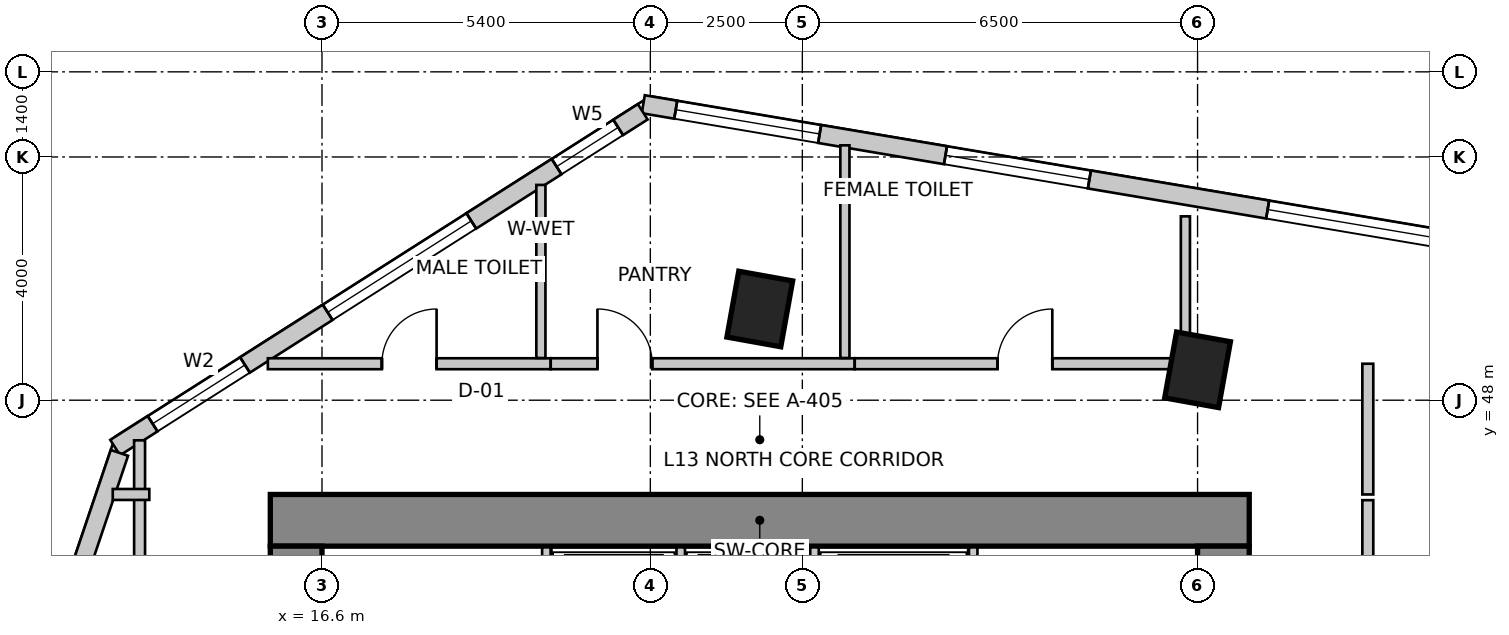
"""IFC4 building model, lengths in metres.
Left out: names, types, materials, properties, quantities, classifications, styles, units other than length and angle.
Written with IfcOpenShell. Run it as: python <this file> out.ifc"""

import sys

from ifc_helpers import new_model, si_unit, direction, frame, frame_2d, origin, origin_2d, place, context, subcontext, project, spatial, rectangle, extrude, source, transform, mapped, element, fill, save


model = new_model("IFC4")
c1 = context("Model", 3, precision=1e-05, world=origin(), true_north=direction((0.0, 1.0)))
c2 = subcontext(c1, "Body", "Model", "MODEL_VIEW")
j1 = project(units=[si_unit("LENGTHUNIT", "METRE"), si_unit("PLANEANGLEUNIT", "RADIAN")], contexts=[c1])
p1 = place(None, origin())
s1 = spatial("IfcSite", under=j1, at=p1, CompositionType="ELEMENT")
p2 = place(p1, origin())
s2 = spatial("IfcBuilding", under=s1, at=p2, CompositionType="ELEMENT")
p3 = place(p2, frame((0.0, 0.0, 55.0)))
s3 = spatial("IfcBuildingStorey", under=s2, at=p3, CompositionType="ELEMENT", Elevation=55.0)
p4 = place(p3, frame((15.75, 46.025, 0.0), z_axis=(0.0, 0.0, 1.0), x_axis=(1.0, 0.0, 0.0)))
e1 = element("IfcWall", 1, at=p4, inside=s3, PredefinedType="SHEAR", context=c2, shape_type="SweptSolid", body=[
    extrude(rectangle(XDim=16.1, YDim=0.85, at=frame_2d((8.05, 0.0))), origin(), (0.0, 0.0, 1.0), 4.0),
])
p5 = place(p3, frame((16.175, 34.2, 0.0), z_axis=(0.0, 0.0, 1.0), x_axis=(0.0, 1.0, 0.0)))
e2 = element("IfcWall", 2, at=p5, inside=s3, PredefinedType="SHEAR", context=c2, shape_type="SweptSolid", body=[
    extrude(rectangle(XDim=11.4, YDim=0.85, at=frame_2d((5.7, 0.0))), origin(), (0.0, 0.0, 1.0), 4.0),
])
m1 = source(origin(), c2, "Body", "SweptSolid", [
    extrude(rectangle(XDim=1.1, YDim=2.15, at=frame_2d((0.55, 1.075))), frame((0.0, 0.435, 0.0), z_axis=(0.0, -1.0, 0.0), x_axis=(1.0, 0.0, 0.0)), (0.0, 0.0, 1.0), 0.87),
])
p6 = place(p5, frame((7.15, 0.0, 0.0)))
e3 = element("IfcOpeningElement", 3, at=p6, cuts=e2, PredefinedType="OPENING", context=c2, shape_type="MappedRepresentation", body=[
    mapped(m1, transform((0.0, 0.0, 0.0), scale=1.0)),
])
p7 = place(p3, frame((31.425, 34.2, 0.0), z_axis=(0.0, 0.0, 1.0), x_axis=(0.0, 1.0, 0.0)))
e4 = element("IfcWall", 4, at=p7, inside=s3, PredefinedType="SHEAR", context=c2, shape_type="SweptSolid", body=[
    extrude(rectangle(XDim=11.4, YDim=0.85, at=frame_2d((5.7, 0.0))), origin(), (0.0, 0.0, 1.0), 4.0),
])
p8 = place(p7, frame((7.35, 0.0, 0.0)))
e5 = element("IfcOpeningElement", 5, at=p8, cuts=e4, PredefinedType="OPENING", context=c2, shape_type="MappedRepresentation", body=[
    mapped(m1, transform((0.0, 0.0, 0.0), scale=1.0)),
])
m2 = source(origin(), c2, "Body", "SweptSolid", [
    extrude(rectangle(XDim=0.9, YDim=1.1, at=origin_2d()), origin(), (0.0, 0.0, 1.0), 4.0),
])
for number, where, z_axis, x_axis in (
    (6, (23.8, 49.5, 0.0), (0.0, 0.0, 1.0), (0.984, -0.177, 0.0)),
    (7, (31.0, 48.5, 0.0), (0.0, 0.0, 1.0), (0.984, -0.177, 0.0)),
):
    element("IfcColumn", number, at=place(p3, frame(where, z_axis=z_axis, x_axis=x_axis)), inside=s3, PredefinedType="COLUMN", context=c2, shape_type="MappedRepresentation", body=[
        mapped(m2, transform((0.0, 0.0, 0.0), scale=1.0)),
    ])
p9 = place(p3, frame((58.761, 46.648, 0.0), z_axis=(0.0, 0.0, 1.0), x_axis=(-0.98607502735, 0.166301053624, 0.0)))
e8 = element("IfcWall", 8, at=p9, inside=s3, PredefinedType="SOLIDWALL", context=c2, shape_type="SweptSolid", body=[
    extrude(rectangle(XDim=37.397, YDim=0.3, at=frame_2d((18.699, 0.0))), origin(), (0.0, 0.0, 1.0), 3.75),
])
m3 = source(origin(), c2, "Body", "SweptSolid", [
    extrude(rectangle(XDim=2.1, YDim=2.0, at=frame_2d((1.05, 1.0))), frame((0.0, 0.16, 0.0), z_axis=(0.0, -1.0, 0.0), x_axis=(1.0, 0.0, 0.0)), (0.0, 0.0, 1.0), 0.32),
])
p10 = place(p9, frame((0.525, 0.0, 0.85)))
e9 = element("IfcOpeningElement", 9, at=p10, cuts=e8, PredefinedType="OPENING", context=c2, shape_type="MappedRepresentation", body=[
    mapped(m3, transform((0.0, 0.0, 0.0), scale=1.0)),
])
m4 = source(origin(), c2, "Body", "SweptSolid", [
    extrude(rectangle(XDim=2.4, YDim=2.2, at=frame_2d((1.2, 1.1))), frame((0.0, 0.16, 0.0), z_axis=(0.0, -1.0, 0.0), x_axis=(1.0, 0.0, 0.0)), (0.0, 0.0, 1.0), 0.32),
])
p11 = place(p9, frame((5.557, 0.0, 0.85)))
e10 = element("IfcOpeningElement", 10, at=p11, cuts=e8, PredefinedType="OPENING", context=c2, shape_type="MappedRepresentation", body=[
    mapped(m4, transform((0.0, 0.0, 0.0), scale=1.0)),
])
p12 = place(p9, frame((12.972, 0.0, 0.85)))
e11 = element("IfcOpeningElement", 11, at=p12, cuts=e8, PredefinedType="OPENING", context=c2, shape_type="MappedRepresentation", body=[
    mapped(m4, transform((0.0, 0.0, 0.0), scale=1.0)),
])
p13 = place(p9, frame((19.394, 0.0, 0.85)))
e12 = element("IfcOpeningElement", 12, at=p13, cuts=e8, PredefinedType="OPENING", context=c2, shape_type="MappedRepresentation", body=[
    mapped(m4, transform((0.0, 0.0, 0.0), scale=1.0)),
])
m5 = source(origin(), c2, "Body", "SweptSolid", [
    extrude(rectangle(XDim=2.8, YDim=2.4, at=frame_2d((1.4, 1.2))), frame((0.0, 0.16, 0.0), z_axis=(0.0, -1.0, 0.0), x_axis=(1.0, 0.0, 0.0)), (0.0, 0.0, 1.0), 0.32),
])
p14 = place(p9, frame((24.184, 0.0, 0.85)))
e13 = element("IfcOpeningElement", 13, at=p14, cuts=e8, PredefinedType="OPENING", context=c2, shape_type="MappedRepresentation", body=[
    mapped(m5, transform((0.0, 0.0, 0.0), scale=1.0)),
])
p15 = place(p9, frame((29.957, 0.0, 0.85)))
e14 = element("IfcOpeningElement", 14, at=p15, cuts=e8, PredefinedType="OPENING", context=c2, shape_type="MappedRepresentation", body=[
    mapped(m4, transform((0.0, 0.0, 0.0), scale=1.0)),
])
p16 = place(p9, frame((34.456, 0.0, 0.85)))
e15 = element("IfcOpeningElement", 15, at=p16, cuts=e8, PredefinedType="OPENING", context=c2, shape_type="MappedRepresentation", body=[
    mapped(m4, transform((0.0, 0.0, 0.0), scale=1.0)),
])
p17 = place(p3, frame((21.875, 52.743, 0.0), z_axis=(0.0, 0.0, 1.0), x_axis=(-0.843647802826, -0.536896996441, 0.0)))
e16 = element("IfcWall", 16, at=p17, inside=s3, PredefinedType="SOLIDWALL", context=c2, shape_type="SweptSolid", body=[
    extrude(rectangle(XDim=10.284, YDim=0.3, at=frame_2d((5.142, 0.0))), origin(), (0.0, 0.0, 1.0), 3.75),
])
m6 = source(origin(), c2, "Body", "SweptSolid", [
    extrude(rectangle(XDim=1.2, YDim=1.6, at=frame_2d((0.6, 0.8))), frame((0.0, 0.16, 0.0), z_axis=(0.0, -1.0, 0.0), x_axis=(1.0, 0.0, 0.0)), (0.0, 0.0, 1.0), 0.32),
])
p18 = place(p17, frame((0.479, 0.0, 0.85)))
e17 = element("IfcOpeningElement", 17, at=p18, cuts=e16, PredefinedType="OPENING", context=c2, shape_type="MappedRepresentation", body=[
    mapped(m6, transform((0.0, 0.0, 0.0), scale=1.0)),
])
p19 = place(p17, frame((3.342, 0.0, 0.85)))
e18 = element("IfcOpeningElement", 18, at=p19, cuts=e16, PredefinedType="OPENING", context=c2, shape_type="MappedRepresentation", body=[
    mapped(m5, transform((0.0, 0.0, 0.0), scale=1.0)),
])
m7 = source(origin(), c2, "Body", "SweptSolid", [
    extrude(rectangle(XDim=1.8, YDim=2.1, at=frame_2d((0.9, 1.05))), frame((0.0, 0.16, 0.0), z_axis=(0.0, -1.0, 0.0), x_axis=(1.0, 0.0, 0.0)), (0.0, 0.0, 1.0), 0.32),
])
p20 = place(p17, frame((7.754, 0.0, 0.85)))
e19 = element("IfcOpeningElement", 19, at=p20, cuts=e16, PredefinedType="OPENING", context=c2, shape_type="MappedRepresentation", body=[
    mapped(m7, transform((0.0, 0.0, 0.0), scale=1.0)),
])
p21 = place(p3, frame((13.269, 47.134, 0.0), z_axis=(0.0, 0.0, 1.0), x_axis=(-0.319920423265, -0.947444416722, 0.0)))
e20 = element("IfcWall", 20, at=p21, inside=s3, PredefinedType="SOLIDWALL", context=c2, shape_type="SweptSolid", body=[
    extrude(rectangle(XDim=16.135, YDim=0.3, at=frame_2d((8.067, 0.0))), origin(), (0.0, 0.0, 1.0), 3.75),
])
p22 = place(p21, frame((2.188, 0.0, 0.85)))
e21 = element("IfcOpeningElement", 21, at=p22, cuts=e20, PredefinedType="OPENING", context=c2, shape_type="MappedRepresentation", body=[
    mapped(m4, transform((0.0, 0.0, 0.0), scale=1.0)),
])
p23 = place(p21, frame((6.959, 0.0, 0.85)))
e22 = element("IfcOpeningElement", 22, at=p23, cuts=e20, PredefinedType="OPENING", context=c2, shape_type="MappedRepresentation", body=[
    mapped(m5, transform((0.0, 0.0, 0.0), scale=1.0)),
])
p24 = place(p21, frame((12.13, 0.0, 0.85)))
e23 = element("IfcOpeningElement", 23, at=p24, cuts=e20, PredefinedType="OPENING", context=c2, shape_type="MappedRepresentation", body=[
    mapped(m4, transform((0.0, 0.0, 0.0), scale=1.0)),
])
for number, where, z_axis, x_axis in (
    (24, (20.29, 43.28, 0.0), (0.0, 0.0, 1.0), (0.0, 1.0, 0.0)),
    (25, (27.31, 43.28, 0.0), (0.0, 0.0, 1.0), (0.0, 1.0, 0.0)),
):
    element("IfcWall", number, at=place(p3, frame(where, z_axis=z_axis, x_axis=x_axis)), inside=s3, PredefinedType="SOLIDWALL", context=c2, shape_type="SweptSolid", body=[
        extrude(rectangle(XDim=2.3, YDim=0.14, at=frame_2d((1.15, 0.0))), origin(), (0.0, 0.0, 1.0), 3.75),
    ])
for number, where, z_axis, x_axis in (
    (26, (22.5, 43.02, 0.0), (0.0, 0.0, 1.0), (0.0, 1.0, 0.0)),
    (27, (24.7, 43.02, 0.0), (0.0, 0.0, 1.0), (0.0, 1.0, 0.0)),
):
    element("IfcWall", number, at=place(p3, frame(where, z_axis=z_axis, x_axis=x_axis)), inside=s3, PredefinedType="SOLIDWALL", context=c2, shape_type="SweptSolid", body=[
        extrude(rectangle(XDim=2.56, YDim=0.14, at=frame_2d((1.28, 0.0))), origin(), (0.0, 0.0, 1.0), 3.75),
    ])
p25 = place(p3, frame((13.6, 33.444, 0.0), z_axis=(0.0, 0.0, 1.0), x_axis=(0.0, 1.0, 0.0)))
e28 = element("IfcWall", 28, at=p25, inside=s3, PredefinedType="PARTITIONING", context=c2, shape_type="SweptSolid", body=[
    extrude(rectangle(XDim=13.896, YDim=0.18, at=frame_2d((6.948, 0.0))), origin(), (0.0, 0.0, 1.0), 2.892),
])
m8 = source(origin(), c2, "Body", "SweptSolid", [
    extrude(rectangle(XDim=0.9, YDim=2.15, at=frame_2d((0.45, 1.075))), frame((0.0, 0.1, 0.0), z_axis=(0.0, -1.0, 0.0), x_axis=(1.0, 0.0, 0.0)), (0.0, 0.0, 1.0), 0.2),
])
p26 = place(p25, frame((4.144, 0.0, 0.0)))
e29 = element("IfcOpeningElement", 29, at=p26, cuts=e28, PredefinedType="OPENING", context=c2, shape_type="MappedRepresentation", body=[
    mapped(m8, transform((0.0, 0.0, 0.0), scale=1.0)),
])
p27 = place(p3, frame((13.76, 46.45, 0.0), z_axis=(0.0, 0.0, 1.0), x_axis=(-1.0, 0.0, 0.0)))
e30 = element("IfcWall", 30, at=p27, inside=s3, PredefinedType="PARTITIONING", context=c2, shape_type="SweptSolid", body=[
    extrude(rectangle(XDim=0.601, YDim=0.18, at=frame_2d((0.301, 0.0))), origin(), (0.0, 0.0, 1.0), 3.75),
])
p28 = place(p3, frame((15.71, 48.6, 0.0), z_axis=(0.0, 0.0, 1.0), x_axis=(1.0, 0.0, 0.0)))
e31 = element("IfcWall", 31, at=p28, inside=s3, PredefinedType="PARTITIONING", context=c2, shape_type="SweptSolid", body=[
    extrude(rectangle(XDim=4.65, YDim=0.18, at=frame_2d((2.325, 0.0))), origin(), (0.0, 0.0, 1.0), 3.75),
])
p29 = place(p28, frame((1.875, 0.0, 0.0)))
e32 = element("IfcOpeningElement", 32, at=p29, cuts=e31, PredefinedType="OPENING", context=c2, shape_type="MappedRepresentation", body=[
    mapped(m8, transform((0.0, 0.0, 0.0), scale=1.0)),
])
p30 = place(p3, frame((20.362, 48.6, 0.0), z_axis=(0.0, 0.0, 1.0), x_axis=(1.0, 0.0, 0.0)))
e33 = element("IfcWall", 33, at=p30, inside=s3, PredefinedType="PARTITIONING", context=c2, shape_type="SweptSolid", body=[
    extrude(rectangle(XDim=4.998, YDim=0.18, at=frame_2d((2.499, 0.0))), origin(), (0.0, 0.0, 1.0), 3.419),
])
p31 = place(p30, frame((0.768, 0.0, 0.0)))
e34 = element("IfcOpeningElement", 34, at=p31, cuts=e33, PredefinedType="OPENING", context=c2, shape_type="MappedRepresentation", body=[
    mapped(m8, transform((0.0, 0.0, 0.0), scale=1.0)),
])
p32 = place(p3, frame((25.362, 48.6, 0.0), z_axis=(0.0, 0.0, 1.0), x_axis=(1.0, 0.0, 0.0)))
e35 = element("IfcWall", 35, at=p32, inside=s3, PredefinedType="PARTITIONING", context=c2, shape_type="SweptSolid", body=[
    extrude(rectangle(XDim=5.598, YDim=0.18, at=frame_2d((2.799, 0.0))), origin(), (0.0, 0.0, 1.0), 2.892),
])
p33 = place(p32, frame((2.349, 0.0, 0.0)))
e36 = element("IfcOpeningElement", 36, at=p33, cuts=e35, PredefinedType="OPENING", context=c2, shape_type="MappedRepresentation", body=[
    mapped(m8, transform((0.0, 0.0, 0.0), scale=1.0)),
])
p34 = place(p3, frame((33.8, 48.6, 0.0), z_axis=(0.0, 0.0, 1.0), x_axis=(0.0, -1.0, 0.0)))
e37 = element("IfcWall", 37, at=p34, inside=s3, PredefinedType="PARTITIONING", context=c2, shape_type="SweptSolid", body=[
    extrude(rectangle(XDim=2.15, YDim=0.18, at=frame_2d((1.075, 0.0))), origin(), (0.0, 0.0, 1.0), 2.892),
])
p35 = place(p3, frame((33.8, 46.356, 0.0), z_axis=(0.0, 0.0, 1.0), x_axis=(0.0, -1.0, 0.0)))
e38 = element("IfcWall", 38, at=p35, inside=s3, PredefinedType="PARTITIONING", context=c2, shape_type="SweptSolid", body=[
    extrude(rectangle(XDim=8.516, YDim=0.18, at=frame_2d((4.258, 0.0))), origin(), (0.0, 0.0, 1.0), 3.279),
])
p36 = place(p3, frame((20.2, 51.54, 0.0), z_axis=(0.0, 0.0, 1.0), x_axis=(0.0, -1.0, 0.0)))
e39 = element("IfcWall", 39, at=p36, inside=s3, PredefinedType="PARTITIONING", context=c2, shape_type="SweptSolid", body=[
    extrude(rectangle(XDim=2.846, YDim=0.15, at=frame_2d((1.423, 0.0))), origin(), (0.0, 0.0, 1.0), 3.75),
])
p37 = place(p3, frame((25.2, 52.192, 0.0), z_axis=(0.0, 0.0, 1.0), x_axis=(0.0, -1.0, 0.0)))
e40 = element("IfcWall", 40, at=p37, inside=s3, PredefinedType="PARTITIONING", context=c2, shape_type="SweptSolid", body=[
    extrude(rectangle(XDim=3.498, YDim=0.15, at=frame_2d((1.749, 0.0))), origin(), (0.0, 0.0, 1.0), 2.892),
])
p38 = place(p3, frame((30.8, 51.024, 0.0), z_axis=(0.0, 0.0, 1.0), x_axis=(0.0, -1.0, 0.0)))
e41 = element("IfcWall", 41, at=p38, inside=s3, PredefinedType="PARTITIONING", context=c2, shape_type="SweptSolid", body=[
    extrude(rectangle(XDim=2.204, YDim=0.15, at=frame_2d((1.102, 0.0))), origin(), (0.0, 0.0, 1.0), 3.75),
])
m9 = source(origin(), c2, "Body", "SweptSolid", [
    extrude(rectangle(XDim=2.8, YDim=2.4, at=frame_2d((1.4, 1.2))), frame((0.0, -0.015, 0.0), z_axis=(0.0, -1.0, 0.0), x_axis=(1.0, 0.0, 0.0)), (0.0, 0.0, 1.0), 0.06),
])
p39 = place(p14, origin())
e42 = element("IfcWindow", 42, at=p39, inside=s3, PartitioningType="SINGLE_PANEL", PredefinedType="WINDOW", context=c2, shape_type="MappedRepresentation", body=[
    mapped(m9, transform((0.0, 0.0, 0.0), scale=1.0)),
])
fill(e13, e42)
m10 = source(origin(), c2, "Body", "SweptSolid", [
    extrude(rectangle(XDim=2.4, YDim=2.2, at=frame_2d((1.2, 1.1))), frame((0.0, -0.015, 0.0), z_axis=(0.0, -1.0, 0.0), x_axis=(1.0, 0.0, 0.0)), (0.0, 0.0, 1.0), 0.06),
])
p40 = place(p15, origin())
e43 = element("IfcWindow", 43, at=p40, inside=s3, PartitioningType="SINGLE_PANEL", PredefinedType="WINDOW", context=c2, shape_type="MappedRepresentation", body=[
    mapped(m10, transform((0.0, 0.0, 0.0), scale=1.0)),
])
fill(e14, e43)
p41 = place(p16, origin())
e44 = element("IfcWindow", 44, at=p41, inside=s3, PartitioningType="SINGLE_PANEL", PredefinedType="WINDOW", context=c2, shape_type="MappedRepresentation", body=[
    mapped(m10, transform((0.0, 0.0, 0.0), scale=1.0)),
])
fill(e15, e44)
m11 = source(origin(), c2, "Body", "SweptSolid", [
    extrude(rectangle(XDim=1.2, YDim=1.6, at=frame_2d((0.6, 0.8))), frame((0.0, -0.015, 0.0), z_axis=(0.0, -1.0, 0.0), x_axis=(1.0, 0.0, 0.0)), (0.0, 0.0, 1.0), 0.06),
])
p42 = place(p18, origin())
e45 = element("IfcWindow", 45, at=p42, inside=s3, PartitioningType="SINGLE_PANEL", PredefinedType="WINDOW", context=c2, shape_type="MappedRepresentation", body=[
    mapped(m11, transform((0.0, 0.0, 0.0), scale=1.0)),
])
fill(e17, e45)
p43 = place(p19, origin())
e46 = element("IfcWindow", 46, at=p43, inside=s3, PartitioningType="SINGLE_PANEL", PredefinedType="WINDOW", context=c2, shape_type="MappedRepresentation", body=[
    mapped(m9, transform((0.0, 0.0, 0.0), scale=1.0)),
])
fill(e18, e46)
m12 = source(origin(), c2, "Body", "SweptSolid", [
    extrude(rectangle(XDim=1.8, YDim=2.1, at=frame_2d((0.9, 1.05))), frame((0.0, -0.015, 0.0), z_axis=(0.0, -1.0, 0.0), x_axis=(1.0, 0.0, 0.0)), (0.0, 0.0, 1.0), 0.06),
])
p44 = place(p20, origin())
e47 = element("IfcWindow", 47, at=p44, inside=s3, PartitioningType="SINGLE_PANEL", PredefinedType="WINDOW", context=c2, shape_type="MappedRepresentation", body=[
    mapped(m12, transform((0.0, 0.0, 0.0), scale=1.0)),
])
fill(e19, e47)
m13 = source(origin(), c2, "Body", "SweptSolid", [
    extrude(rectangle(XDim=0.9, YDim=2.15, at=frame_2d((0.45, 1.075))), frame((0.0, 0.025, 0.0), z_axis=(0.0, -1.0, 0.0), x_axis=(1.0, 0.0, 0.0)), (0.0, 0.0, 1.0), 0.05),
])
p45 = place(p29, origin())
e48 = element("IfcDoor", 48, at=p45, inside=s3, OperationType="SINGLE_SWING_RIGHT", PredefinedType="DOOR", context=c2, shape_type="MappedRepresentation", body=[
    mapped(m13, transform((0.0, 0.0, 0.0), scale=1.0)),
])
fill(e32, e48)
p46 = place(p31, origin())
e49 = element("IfcDoor", 49, at=p46, inside=s3, OperationType="SINGLE_SWING_LEFT", PredefinedType="DOOR", context=c2, shape_type="MappedRepresentation", body=[
    mapped(m13, transform((0.0, 0.0, 0.0), scale=1.0)),
])
fill(e34, e49)
p47 = place(p33, origin())
e50 = element("IfcDoor", 50, at=p47, inside=s3, OperationType="SINGLE_SWING_RIGHT", PredefinedType="DOOR", context=c2, shape_type="MappedRepresentation", body=[
    mapped(m13, transform((0.0, 0.0, 0.0), scale=1.0)),
])
fill(e36, e50)
save(model, sys.argv[1])
